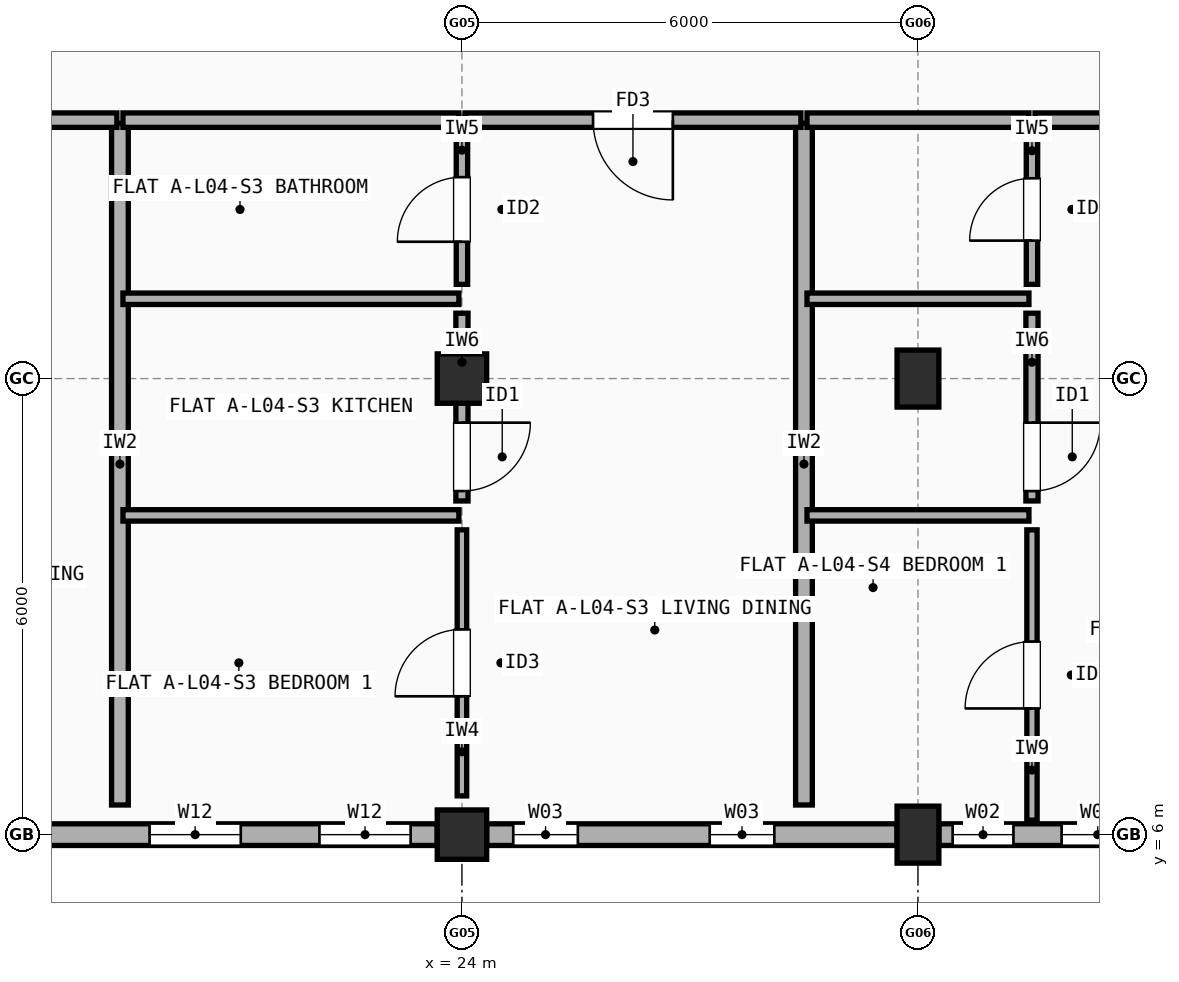
"""IFC4 building model, lengths in metres.
Left out: names, types, materials, properties, quantities, classifications, styles, units other than length and angle.
Written with IfcOpenShell. Run it as: python <this file> out.ifc"""

import sys

from ifc_helpers import new_model, si_unit, direction, frame, frame_2d, origin, origin_2d, place, context, subcontext, project, spatial, rectangle, extrude, element, fill, save


model = new_model("IFC4")
c1 = context("Model", 3, precision=1e-05, world=origin(), true_north=direction((0.0, 1.0)))
c2 = subcontext(c1, "Body", "Model", "MODEL_VIEW")
j1 = project(units=[si_unit("LENGTHUNIT", "METRE"), si_unit("PLANEANGLEUNIT", "RADIAN")], contexts=[c1])
p1 = place(None, origin())
s1 = spatial("IfcSite", under=j1, at=p1, CompositionType="ELEMENT")
p2 = place(p1, origin())
s2 = spatial("IfcBuilding", under=s1, at=p2, CompositionType="ELEMENT")
p3 = place(p2, frame((0.0, 0.0, 14.1)))
s3 = spatial("IfcBuildingStorey", under=s2, at=p3, CompositionType="ELEMENT", Elevation=14.1)
for number, where, z_axis, x_axis in (
    (1, (24.0, 6.0, 0.0), (0.0, 0.0, 1.0), (1.0, 0.0, 0.0)),
    (2, (24.0, 12.0, 0.0), (0.0, 0.0, 1.0), (1.0, 0.0, 0.0)),
):
    element("IfcColumn", number, at=place(p3, frame(where, z_axis=z_axis, x_axis=x_axis)), inside=s3, PredefinedType="COLUMN", context=c2, shape_type="SweptSolid", body=[
        extrude(rectangle(XDim=0.65, YDim=0.65, at=origin_2d()), origin(), (0.0, 0.0, 1.0), 2.95),
    ])
for number, where, z_axis, x_axis in (
    (3, (30.0, 6.0, 0.0), (0.0, 0.0, 1.0), (1.0, 0.0, 0.0)),
    (4, (30.0, 12.0, 0.0), (0.0, 0.0, 1.0), (1.0, 0.0, 0.0)),
):
    element("IfcColumn", number, at=place(p3, frame(where, z_axis=z_axis, x_axis=x_axis)), inside=s3, PredefinedType="COLUMN", context=c2, shape_type="SweptSolid", body=[
        extrude(rectangle(XDim=0.55, YDim=0.75, at=origin_2d()), origin(), (0.0, 0.0, 1.0), 2.95),
    ])
p4 = place(p3, frame((18.325, 6.0, 0.0), z_axis=(0.0, 0.0, 1.0), x_axis=(1.0, 0.0, 0.0)))
e5 = element("IfcWall", 5, at=p4, inside=s3, PredefinedType="STANDARD", context=c2, shape_type="SweptSolid", body=[
    extrude(rectangle(XDim=5.35, YDim=0.285, at=frame_2d((2.675, 0.0))), origin(), (0.0, 0.0, 1.0), 2.432),
])
p5 = place(p4, frame((1.565, 0.0, 0.9)))
e6 = element("IfcOpeningElement", 6, at=p5, cuts=e5, PredefinedType="OPENING", context=c2, shape_type="SweptSolid", body=[
    extrude(rectangle(XDim=1.2, YDim=1.35, at=frame_2d((0.6, 0.675))), frame((0.0, 0.152, 0.0), z_axis=(0.0, -1.0, 0.0), x_axis=(1.0, 0.0, 0.0)), (0.0, 0.0, 1.0), 0.305),
])
p6 = place(p4, frame((3.8, 0.0, 0.9)))
e7 = element("IfcOpeningElement", 7, at=p6, cuts=e5, PredefinedType="OPENING", context=c2, shape_type="SweptSolid", body=[
    extrude(rectangle(XDim=1.2, YDim=1.35, at=frame_2d((0.6, 0.675))), frame((0.0, 0.152, 0.0), z_axis=(0.0, -1.0, 0.0), x_axis=(1.0, 0.0, 0.0)), (0.0, 0.0, 1.0), 0.305),
])
p7 = place(p3, frame((24.325, 6.0, 0.0), z_axis=(0.0, 0.0, 1.0), x_axis=(1.0, 0.0, 0.0)))
e8 = element("IfcWall", 8, at=p7, inside=s3, PredefinedType="STANDARD", context=c2, shape_type="SweptSolid", body=[
    extrude(rectangle(XDim=5.4, YDim=0.285, at=frame_2d((2.7, 0.0))), origin(), (0.0, 0.0, 1.0), 2.432),
])
p8 = place(p7, frame((0.35, 0.0, 0.9)))
e9 = element("IfcOpeningElement", 9, at=p8, cuts=e8, PredefinedType="OPENING", context=c2, shape_type="SweptSolid", body=[
    extrude(rectangle(XDim=0.85, YDim=1.25, at=frame_2d((0.425, 0.625))), frame((0.0, 0.152, 0.0), z_axis=(0.0, -1.0, 0.0), x_axis=(1.0, 0.0, 0.0)), (0.0, 0.0, 1.0), 0.305),
])
p9 = place(p7, frame((2.935, 0.0, 0.9)))
e10 = element("IfcOpeningElement", 10, at=p9, cuts=e8, PredefinedType="OPENING", context=c2, shape_type="SweptSolid", body=[
    extrude(rectangle(XDim=0.85, YDim=1.25, at=frame_2d((0.425, 0.625))), frame((0.0, 0.152, 0.0), z_axis=(0.0, -1.0, 0.0), x_axis=(1.0, 0.0, 0.0)), (0.0, 0.0, 1.0), 0.305),
])
p10 = place(p3, frame((30.275, 6.0, 0.0), z_axis=(0.0, 0.0, 1.0), x_axis=(1.0, 0.0, 0.0)))
e11 = element("IfcWall", 11, at=p10, inside=s3, PredefinedType="STANDARD", context=c2, shape_type="SweptSolid", body=[
    extrude(rectangle(XDim=5.45, YDim=0.285, at=frame_2d((2.725, 0.0))), origin(), (0.0, 0.0, 1.0), 2.432),
])
p11 = place(p10, frame((1.615, 0.0, 0.9)))
e12 = element("IfcOpeningElement", 12, at=p11, cuts=e11, PredefinedType="OPENING", context=c2, shape_type="SweptSolid", body=[
    extrude(rectangle(XDim=0.95, YDim=1.35, at=frame_2d((0.475, 0.675))), frame((0.0, 0.152, 0.0), z_axis=(0.0, -1.0, 0.0), x_axis=(1.0, 0.0, 0.0)), (0.0, 0.0, 1.0), 0.305),
])
p12 = place(p10, frame((4.15, 0.0, 0.9)))
e13 = element("IfcOpeningElement", 13, at=p12, cuts=e11, PredefinedType="OPENING", context=c2, shape_type="SweptSolid", body=[
    extrude(rectangle(XDim=0.95, YDim=1.35, at=frame_2d((0.475, 0.675))), frame((0.0, 0.152, 0.0), z_axis=(0.0, -1.0, 0.0), x_axis=(1.0, 0.0, 0.0)), (0.0, 0.0, 1.0), 0.305),
])
p13 = place(p10, frame((0.181, 0.0, 0.9)))
e14 = element("IfcOpeningElement", 14, at=p13, cuts=e11, PredefinedType="OPENING", context=c2, shape_type="SweptSolid", body=[
    extrude(rectangle(XDim=0.8, YDim=1.2, at=frame_2d((0.4, 0.6))), frame((0.0, 0.152, 0.0), z_axis=(0.0, -1.0, 0.0), x_axis=(1.0, 0.0, 0.0)), (0.0, 0.0, 1.0), 0.305),
])
p14 = place(p3, frame((19.5, 6.39, 0.0), z_axis=(0.0, 0.0, 1.0), x_axis=(0.0, 1.0, 0.0)))
e15 = element("IfcWall", 15, at=p14, inside=s3, PredefinedType="SOLIDWALL", context=c2, shape_type="SweptSolid", body=[
    extrude(rectangle(XDim=8.97, YDim=0.22, at=frame_2d((4.485, 0.0))), origin(), (0.0, 0.0, 1.0), 2.408),
])
p15 = place(p3, frame((15.04, 15.4, 0.0), z_axis=(0.0, 0.0, 1.0), x_axis=(1.0, 0.0, 0.0)))
e16 = element("IfcWall", 16, at=p15, inside=s3, PredefinedType="SOLIDWALL", context=c2, shape_type="SweptSolid", body=[
    extrude(rectangle(XDim=4.42, YDim=0.19, at=frame_2d((2.21, 0.0))), origin(), (0.0, 0.0, 1.0), 2.508),
])
p16 = place(p15, frame((1.72, 0.0, 0.0)))
e17 = element("IfcOpeningElement", 17, at=p16, cuts=e16, PredefinedType="OPENING", context=c2, shape_type="SweptSolid", body=[
    extrude(rectangle(XDim=0.98, YDim=2.15, at=frame_2d((0.49, 1.075))), frame((0.0, 0.105, 0.0), z_axis=(0.0, -1.0, 0.0), x_axis=(1.0, 0.0, 0.0)), (0.0, 0.0, 1.0), 0.21),
])
p17 = place(p3, frame((28.5, 6.39, 0.0), z_axis=(0.0, 0.0, 1.0), x_axis=(0.0, 1.0, 0.0)))
e18 = element("IfcWall", 18, at=p17, inside=s3, PredefinedType="SOLIDWALL", context=c2, shape_type="SweptSolid", body=[
    extrude(rectangle(XDim=8.97, YDim=0.22, at=frame_2d((4.485, 0.0))), origin(), (0.0, 0.0, 1.0), 2.548),
])
p18 = place(p3, frame((19.54, 15.4, 0.0), z_axis=(0.0, 0.0, 1.0), x_axis=(1.0, 0.0, 0.0)))
e19 = element("IfcWall", 19, at=p18, inside=s3, PredefinedType="SOLIDWALL", context=c2, shape_type="SweptSolid", body=[
    extrude(rectangle(XDim=4.42, YDim=0.19, at=frame_2d((2.21, 0.0))), origin(), (0.0, 0.0, 1.0), 2.458),
])
p19 = place(p3, frame((24.04, 15.4, 0.0), z_axis=(0.0, 0.0, 1.0), x_axis=(1.0, 0.0, 0.0)))
e20 = element("IfcWall", 20, at=p19, inside=s3, PredefinedType="SOLIDWALL", context=c2, shape_type="SweptSolid", body=[
    extrude(rectangle(XDim=4.42, YDim=0.19, at=frame_2d((2.21, 0.0))), origin(), (0.0, 0.0, 1.0), 2.458),
])
p20 = place(p19, frame((1.685, 0.0, 0.0)))
e21 = element("IfcOpeningElement", 21, at=p20, cuts=e20, PredefinedType="OPENING", context=c2, shape_type="SweptSolid", body=[
    extrude(rectangle(XDim=1.05, YDim=2.15, at=frame_2d((0.525, 1.075))), frame((0.0, 0.105, 0.0), z_axis=(0.0, -1.0, 0.0), x_axis=(1.0, 0.0, 0.0)), (0.0, 0.0, 1.0), 0.21),
])
p21 = place(p3, frame((24.0, 6.51, 0.0), z_axis=(0.0, 0.0, 1.0), x_axis=(0.0, 1.0, 0.0)))
e22 = element("IfcWall", 22, at=p21, inside=s3, PredefinedType="PARTITIONING", context=c2, shape_type="SweptSolid", body=[
    extrude(rectangle(XDim=3.5, YDim=0.125, at=frame_2d((1.75, 0.0))), origin(), (0.0, 0.0, 1.0), 2.508),
])
p22 = place(p21, frame((1.31, 0.0, 0.0)))
e23 = element("IfcOpeningElement", 23, at=p22, cuts=e22, PredefinedType="OPENING", context=c2, shape_type="SweptSolid", body=[
    extrude(rectangle(XDim=0.88, YDim=2.1, at=frame_2d((0.44, 1.05))), frame((0.0, 0.073, 0.0), z_axis=(0.0, -1.0, 0.0), x_axis=(1.0, 0.0, 0.0)), (0.0, 0.0, 1.0), 0.145),
])
p23 = place(p3, frame((24.0, 10.39, 0.0), z_axis=(0.0, 0.0, 1.0), x_axis=(0.0, 1.0, 0.0)))
e24 = element("IfcWall", 24, at=p23, inside=s3, PredefinedType="PLUMBINGWALL", context=c2, shape_type="SweptSolid", body=[
    extrude(rectangle(XDim=2.47, YDim=0.16, at=frame_2d((1.235, 0.0))), origin(), (0.0, 0.0, 1.0), 2.458),
])
p24 = place(p23, frame((0.13, 0.0, 0.0)))
e25 = element("IfcOpeningElement", 25, at=p24, cuts=e24, PredefinedType="OPENING", context=c2, shape_type="SweptSolid", body=[
    extrude(rectangle(XDim=0.9, YDim=2.1, at=frame_2d((0.45, 1.05))), frame((0.0, 0.09, 0.0), z_axis=(0.0, -1.0, 0.0), x_axis=(1.0, 0.0, 0.0)), (0.0, 0.0, 1.0), 0.18),
])
p25 = place(p3, frame((24.0, 13.24, 0.0), z_axis=(0.0, 0.0, 1.0), x_axis=(0.0, 1.0, 0.0)))
e26 = element("IfcWall", 26, at=p25, inside=s3, PredefinedType="PARTITIONING", context=c2, shape_type="SweptSolid", body=[
    extrude(rectangle(XDim=1.97, YDim=0.15, at=frame_2d((0.985, 0.0))), origin(), (0.0, 0.0, 1.0), 2.458),
])
p26 = place(p25, frame((0.56, 0.0, 0.0)))
e27 = element("IfcOpeningElement", 27, at=p26, cuts=e26, PredefinedType="OPENING", context=c2, shape_type="SweptSolid", body=[
    extrude(rectangle(XDim=0.85, YDim=2.1, at=frame_2d((0.425, 1.05))), frame((0.0, 0.085, 0.0), z_axis=(0.0, -1.0, 0.0), x_axis=(1.0, 0.0, 0.0)), (0.0, 0.0, 1.0), 0.17),
])
p27 = place(p3, frame((19.54, 10.2, 0.0), z_axis=(0.0, 0.0, 1.0), x_axis=(1.0, 0.0, 0.0)))
e28 = element("IfcWall", 28, at=p27, inside=s3, PredefinedType="PARTITIONING", context=c2, shape_type="SweptSolid", body=[
    extrude(rectangle(XDim=4.42, YDim=0.15, at=frame_2d((2.21, 0.0))), origin(), (0.0, 0.0, 1.0), 2.508),
])
p28 = place(p3, frame((19.54, 13.05, 0.0), z_axis=(0.0, 0.0, 1.0), x_axis=(1.0, 0.0, 0.0)))
e29 = element("IfcWall", 29, at=p28, inside=s3, PredefinedType="PARTITIONING", context=c2, shape_type="SweptSolid", body=[
    extrude(rectangle(XDim=4.42, YDim=0.15, at=frame_2d((2.21, 0.0))), origin(), (0.0, 0.0, 1.0), 2.458),
])
p29 = place(p3, frame((28.54, 15.4, 0.0), z_axis=(0.0, 0.0, 1.0), x_axis=(1.0, 0.0, 0.0)))
e30 = element("IfcWall", 30, at=p29, inside=s3, PredefinedType="SOLIDWALL", context=c2, shape_type="SweptSolid", body=[
    extrude(rectangle(XDim=2.92, YDim=0.19, at=frame_2d((1.46, 0.0))), origin(), (0.0, 0.0, 1.0), 2.432),
])
p30 = place(p3, frame((31.54, 15.4, 0.0), z_axis=(0.0, 0.0, 1.0), x_axis=(1.0, 0.0, 0.0)))
e31 = element("IfcWall", 31, at=p30, inside=s3, PredefinedType="SOLIDWALL", context=c2, shape_type="SweptSolid", body=[
    extrude(rectangle(XDim=4.42, YDim=0.19, at=frame_2d((2.21, 0.0))), origin(), (0.0, 0.0, 1.0), 2.432),
])
p31 = place(p30, frame((1.71, 0.0, 0.0)))
e32 = element("IfcOpeningElement", 32, at=p31, cuts=e31, PredefinedType="OPENING", context=c2, shape_type="SweptSolid", body=[
    extrude(rectangle(XDim=1.0, YDim=2.15, at=frame_2d((0.5, 1.075))), frame((0.0, 0.105, 0.0), z_axis=(0.0, -1.0, 0.0), x_axis=(1.0, 0.0, 0.0)), (0.0, 0.0, 1.0), 0.21),
])
p32 = place(p3, frame((31.5, 6.19, 0.0), z_axis=(0.0, 0.0, 1.0), x_axis=(0.0, 1.0, 0.0)))
e33 = element("IfcWall", 33, at=p32, inside=s3, PredefinedType="PARTITIONING", context=c2, shape_type="SweptSolid", body=[
    extrude(rectangle(XDim=3.82, YDim=0.135, at=frame_2d((1.91, 0.0))), origin(), (0.0, 0.0, 1.0), 2.95),
])
p33 = place(p32, frame((1.47, 0.0, 0.0)))
e34 = element("IfcOpeningElement", 34, at=p33, cuts=e33, PredefinedType="OPENING", context=c2, shape_type="SweptSolid", body=[
    extrude(rectangle(XDim=0.88, YDim=2.1, at=frame_2d((0.44, 1.05))), frame((0.0, 0.077, 0.0), z_axis=(0.0, -1.0, 0.0), x_axis=(1.0, 0.0, 0.0)), (0.0, 0.0, 1.0), 0.155),
])
p34 = place(p3, frame((31.5, 10.39, 0.0), z_axis=(0.0, 0.0, 1.0), x_axis=(0.0, 1.0, 0.0)))
e35 = element("IfcWall", 35, at=p34, inside=s3, PredefinedType="PLUMBINGWALL", context=c2, shape_type="SweptSolid", body=[
    extrude(rectangle(XDim=2.47, YDim=0.16, at=frame_2d((1.235, 0.0))), origin(), (0.0, 0.0, 1.0), 2.508),
])
p35 = place(p34, frame((0.13, 0.0, 0.0)))
e36 = element("IfcOpeningElement", 36, at=p35, cuts=e35, PredefinedType="OPENING", context=c2, shape_type="SweptSolid", body=[
    extrude(rectangle(XDim=0.9, YDim=2.1, at=frame_2d((0.45, 1.05))), frame((0.0, 0.09, 0.0), z_axis=(0.0, -1.0, 0.0), x_axis=(1.0, 0.0, 0.0)), (0.0, 0.0, 1.0), 0.18),
])
p36 = place(p3, frame((31.5, 13.24, 0.0), z_axis=(0.0, 0.0, 1.0), x_axis=(0.0, 1.0, 0.0)))
e37 = element("IfcWall", 37, at=p36, inside=s3, PredefinedType="PARTITIONING", context=c2, shape_type="SweptSolid", body=[
    extrude(rectangle(XDim=1.97, YDim=0.15, at=frame_2d((0.985, 0.0))), origin(), (0.0, 0.0, 1.0), 2.95),
])
p37 = place(p36, frame((0.575, 0.0, 0.0)))
e38 = element("IfcOpeningElement", 38, at=p37, cuts=e37, PredefinedType="OPENING", context=c2, shape_type="SweptSolid", body=[
    extrude(rectangle(XDim=0.82, YDim=2.08, at=frame_2d((0.41, 1.04))), frame((0.0, 0.085, 0.0), z_axis=(0.0, -1.0, 0.0), x_axis=(1.0, 0.0, 0.0)), (0.0, 0.0, 1.0), 0.17),
])
for number, where, z_axis, x_axis in (
    (39, (28.54, 10.2, 0.0), (0.0, 0.0, 1.0), (1.0, 0.0, 0.0)),
    (40, (28.54, 13.05, 0.0), (0.0, 0.0, 1.0), (1.0, 0.0, 0.0)),
):
    element("IfcWall", number, at=place(p3, frame(where, z_axis=z_axis, x_axis=x_axis)), inside=s3, PredefinedType="PARTITIONING", context=c2, shape_type="SweptSolid", body=[
        extrude(rectangle(XDim=2.92, YDim=0.15, at=frame_2d((1.46, 0.0))), origin(), (0.0, 0.0, 1.0), 2.432),
    ])
p38 = place(p5, origin())
e41 = element("IfcWindow", 41, at=p38, inside=s3, PartitioningType="SINGLE_PANEL", PredefinedType="WINDOW", context=c2, shape_type="SweptSolid", body=[
    extrude(rectangle(XDim=1.2, YDim=1.35, at=frame_2d((0.6, 0.675))), frame((0.0, 0.03, 0.0), z_axis=(0.0, -1.0, 0.0), x_axis=(1.0, 0.0, 0.0)), (0.0, 0.0, 1.0), 0.06),
])
fill(e6, e41)
p39 = place(p6, origin())
e42 = element("IfcWindow", 42, at=p39, inside=s3, PartitioningType="SINGLE_PANEL", PredefinedType="WINDOW", context=c2, shape_type="SweptSolid", body=[
    extrude(rectangle(XDim=1.2, YDim=1.35, at=frame_2d((0.6, 0.675))), frame((0.0, 0.03, 0.0), z_axis=(0.0, -1.0, 0.0), x_axis=(1.0, 0.0, 0.0)), (0.0, 0.0, 1.0), 0.06),
])
fill(e7, e42)
p40 = place(p8, origin())
e43 = element("IfcWindow", 43, at=p40, inside=s3, PartitioningType="SINGLE_PANEL", PredefinedType="WINDOW", context=c2, shape_type="SweptSolid", body=[
    extrude(rectangle(XDim=0.85, YDim=1.25, at=frame_2d((0.425, 0.625))), frame((0.0, 0.03, 0.0), z_axis=(0.0, -1.0, 0.0), x_axis=(1.0, 0.0, 0.0)), (0.0, 0.0, 1.0), 0.06),
])
fill(e9, e43)
p41 = place(p9, origin())
e44 = element("IfcWindow", 44, at=p41, inside=s3, PartitioningType="SINGLE_PANEL", PredefinedType="WINDOW", context=c2, shape_type="SweptSolid", body=[
    extrude(rectangle(XDim=0.85, YDim=1.25, at=frame_2d((0.425, 0.625))), frame((0.0, 0.03, 0.0), z_axis=(0.0, -1.0, 0.0), x_axis=(1.0, 0.0, 0.0)), (0.0, 0.0, 1.0), 0.06),
])
fill(e10, e44)
p42 = place(p11, origin())
e45 = element("IfcWindow", 45, at=p42, inside=s3, PartitioningType="SINGLE_PANEL", PredefinedType="WINDOW", context=c2, shape_type="SweptSolid", body=[
    extrude(rectangle(XDim=0.95, YDim=1.35, at=frame_2d((0.475, 0.675))), frame((0.0, 0.03, 0.0), z_axis=(0.0, -1.0, 0.0), x_axis=(1.0, 0.0, 0.0)), (0.0, 0.0, 1.0), 0.06),
])
fill(e12, e45)
p43 = place(p13, origin())
e46 = element("IfcWindow", 46, at=p43, inside=s3, PartitioningType="SINGLE_PANEL", PredefinedType="WINDOW", context=c2, shape_type="SweptSolid", body=[
    extrude(rectangle(XDim=0.8, YDim=1.2, at=frame_2d((0.4, 0.6))), frame((0.0, 0.03, 0.0), z_axis=(0.0, -1.0, 0.0), x_axis=(1.0, 0.0, 0.0)), (0.0, 0.0, 1.0), 0.06),
])
fill(e14, e46)
p44 = place(p20, origin())
e47 = element("IfcDoor", 47, at=p44, inside=s3, OperationType="SINGLE_SWING_RIGHT", PredefinedType="DOOR", context=c2, shape_type="SweptSolid", body=[
    extrude(rectangle(XDim=1.05, YDim=2.15, at=frame_2d((0.525, 1.075))), frame((0.0, 0.025, 0.0), z_axis=(0.0, -1.0, 0.0), x_axis=(1.0, 0.0, 0.0)), (0.0, 0.0, 1.0), 0.05),
])
fill(e21, e47)
p45 = place(p22, origin())
e48 = element("IfcDoor", 48, at=p45, inside=s3, OperationType="SINGLE_SWING_LEFT", PredefinedType="DOOR", context=c2, shape_type="SweptSolid", body=[
    extrude(rectangle(XDim=0.88, YDim=2.1, at=frame_2d((0.44, 1.05))), frame((0.0, 0.025, 0.0), z_axis=(0.0, -1.0, 0.0), x_axis=(1.0, 0.0, 0.0)), (0.0, 0.0, 1.0), 0.05),
])
fill(e23, e48)
p46 = place(p24, origin())
e49 = element("IfcDoor", 49, at=p46, inside=s3, OperationType="SINGLE_SWING_RIGHT", PredefinedType="DOOR", context=c2, shape_type="SweptSolid", body=[
    extrude(rectangle(XDim=0.9, YDim=2.1, at=frame_2d((0.45, 1.05))), frame((0.0, 0.025, 0.0), z_axis=(0.0, -1.0, 0.0), x_axis=(1.0, 0.0, 0.0)), (0.0, 0.0, 1.0), 0.05),
])
fill(e25, e49)
p47 = place(p26, origin())
e50 = element("IfcDoor", 50, at=p47, inside=s3, OperationType="SINGLE_SWING_LEFT", PredefinedType="DOOR", context=c2, shape_type="SweptSolid", body=[
    extrude(rectangle(XDim=0.85, YDim=2.1, at=frame_2d((0.425, 1.05))), frame((0.0, 0.025, 0.0), z_axis=(0.0, -1.0, 0.0), x_axis=(1.0, 0.0, 0.0)), (0.0, 0.0, 1.0), 0.05),
])
fill(e27, e50)
p48 = place(p33, origin())
e51 = element("IfcDoor", 51, at=p48, inside=s3, OperationType="SINGLE_SWING_LEFT", PredefinedType="DOOR", context=c2, shape_type="SweptSolid", body=[
    extrude(rectangle(XDim=0.88, YDim=2.1, at=frame_2d((0.44, 1.05))), frame((0.0, 0.025, 0.0), z_axis=(0.0, -1.0, 0.0), x_axis=(1.0, 0.0, 0.0)), (0.0, 0.0, 1.0), 0.05),
])
fill(e34, e51)
p49 = place(p35, origin())
e52 = element("IfcDoor", 52, at=p49, inside=s3, OperationType="SINGLE_SWING_RIGHT", PredefinedType="DOOR", context=c2, shape_type="SweptSolid", body=[
    extrude(rectangle(XDim=0.9, YDim=2.1, at=frame_2d((0.45, 1.05))), frame((0.0, 0.025, 0.0), z_axis=(0.0, -1.0, 0.0), x_axis=(1.0, 0.0, 0.0)), (0.0, 0.0, 1.0), 0.05),
])
fill(e36, e52)
p50 = place(p37, origin())
e53 = element("IfcDoor", 53, at=p50, inside=s3, OperationType="SINGLE_SWING_LEFT", PredefinedType="DOOR", context=c2, shape_type="SweptSolid", body=[
    extrude(rectangle(XDim=0.82, YDim=2.08, at=frame_2d((0.41, 1.04))), frame((0.0, 0.025, 0.0), z_axis=(0.0, -1.0, 0.0), x_axis=(1.0, 0.0, 0.0)), (0.0, 0.0, 1.0), 0.05),
])
fill(e38, e53)
save(model, sys.argv[1])
